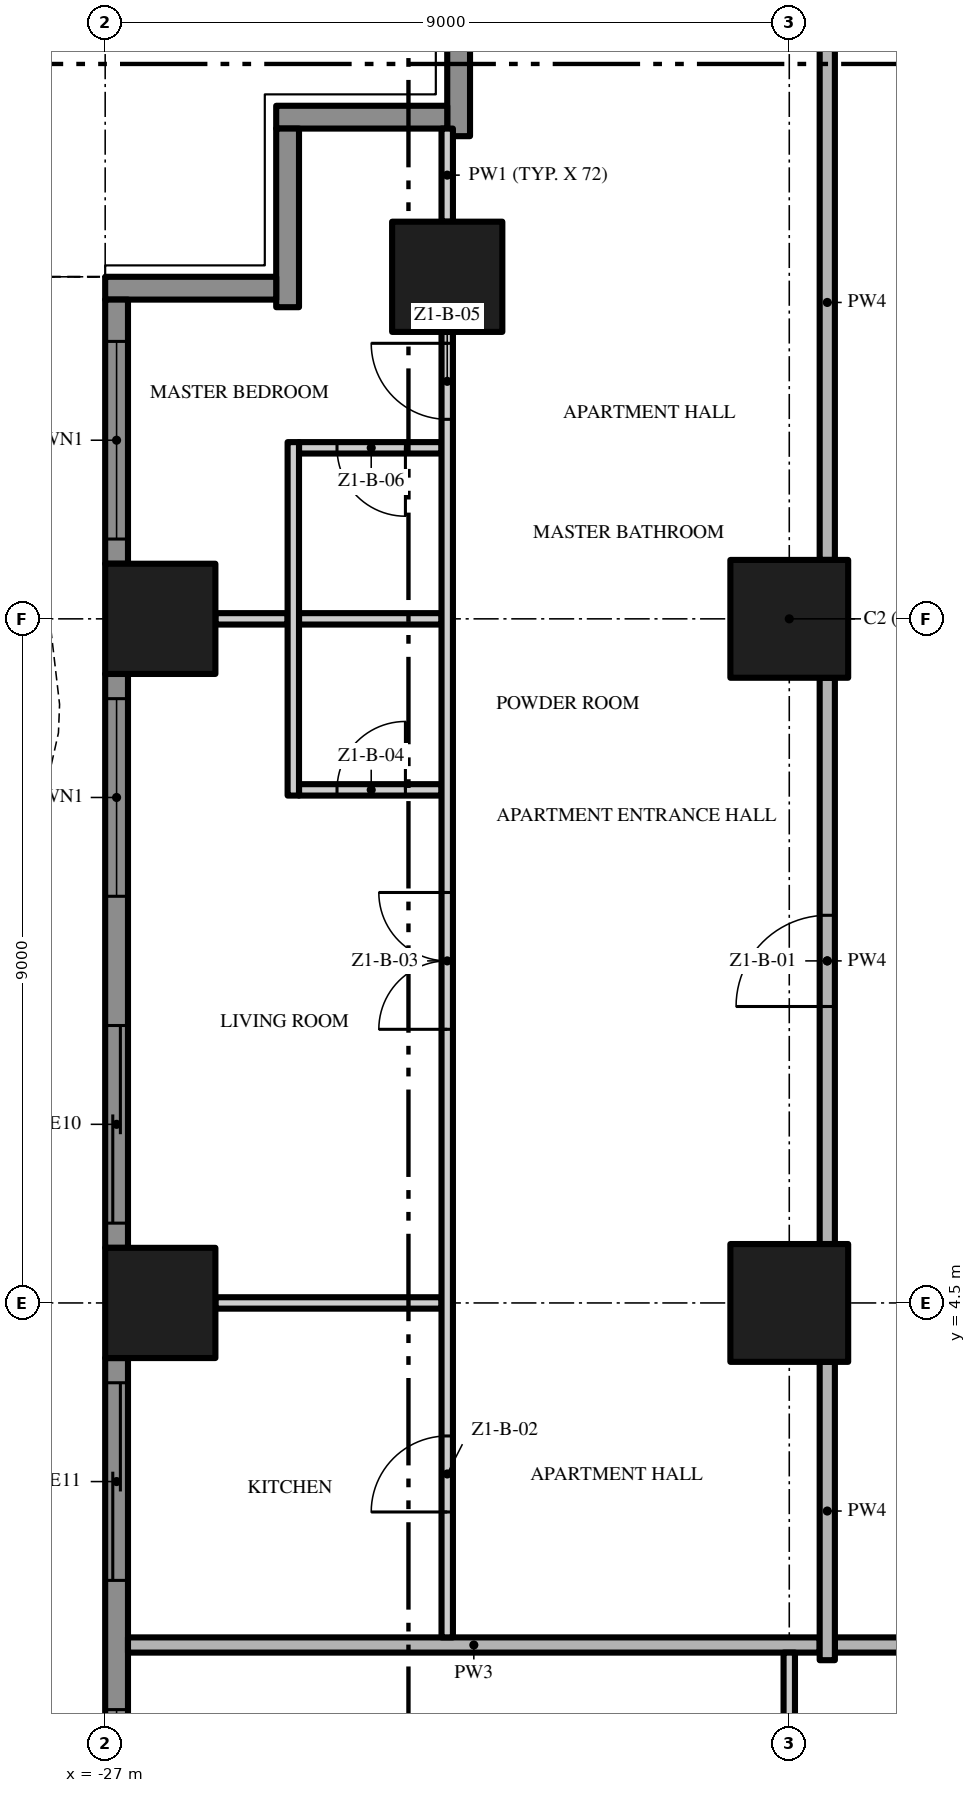
"""IFC4 building model, lengths in metres.
Left out: names, types, materials, properties, quantities, classifications, styles, units other than length and angle.
Written with IfcOpenShell. Run it as: python <this file> out.ifc"""

import sys

from ifc_helpers import new_model, si_unit, direction, frame, frame_2d, origin, origin_2d, place, context, subcontext, project, spatial, polyline, rectangle, outline, extrude, element, fill, save


model = new_model("IFC4")
c1 = context("Model", 3, precision=1e-05, world=origin(), true_north=direction((0.0, 1.0)))
c2 = subcontext(c1, "Body", "Model", "MODEL_VIEW")
j1 = project(units=[si_unit("LENGTHUNIT", "METRE"), si_unit("PLANEANGLEUNIT", "RADIAN")], contexts=[c1])
p1 = place(None, origin())
s1 = spatial("IfcSite", under=j1, at=p1, CompositionType="ELEMENT")
p2 = place(p1, origin())
s2 = spatial("IfcBuilding", under=s1, at=p2, CompositionType="ELEMENT")
p3 = place(p2, frame((0.0, 0.0, 26.4)))
s3 = spatial("IfcBuildingStorey", under=s2, at=p3, CompositionType="ELEMENT", Elevation=26.4)
for number, where, z_axis, x_axis in (
    (1, (-18.0, 13.5, 0.0), (0.0, 0.0, 1.0), (1.0, 0.0, 0.0)),
    (2, (-18.0, 4.5, 0.0), (0.0, 0.0, 1.0), (1.0, 0.0, 0.0)),
):
    element("IfcColumn", number, at=place(p3, frame(where, z_axis=z_axis, x_axis=x_axis)), inside=s3, PredefinedType="COLUMN", context=c2, shape_type="SweptSolid", body=[
        extrude(rectangle(XDim=1.55, YDim=1.55, at=origin_2d()), origin(), (0.0, 0.0, 1.0), 3.5),
    ])
for number, where, z_axis, x_axis in (
    (3, (-26.275, 13.5, 0.0), (0.0, 0.0, 1.0), (1.0, 0.0, 0.0)),
    (4, (-22.5, 18.0, 0.0), (0.0, 0.0, 1.0), (1.0, 0.0, 0.0)),
    (5, (-26.275, 4.5, 0.0), (0.0, 0.0, 1.0), (1.0, 0.0, 0.0)),
):
    element("IfcColumn", number, at=place(p3, frame(where, z_axis=z_axis, x_axis=x_axis)), inside=s3, PredefinedType="COLUMN", context=c2, shape_type="SweptSolid", body=[
        extrude(rectangle(XDim=1.45, YDim=1.45, at=origin_2d()), origin(), (0.0, 0.0, 1.0), 3.5),
    ])
p4 = place(p3, frame((-22.35, 19.85, 0.0), z_axis=(0.0, 0.0, 1.0), x_axis=(0.0, 1.0, 0.0)))
e6 = element("IfcWall", 6, at=p4, inside=s3, PredefinedType="SOLIDWALL", context=c2, shape_type="SweptSolid", body=[
    extrude(rectangle(XDim=2.35, YDim=0.3, at=frame_2d((1.175, 0.0))), origin(), (0.0, 0.0, 1.0), 3.5),
])
p5 = place(p3, frame((-24.75, 20.1, 0.0), z_axis=(0.0, 0.0, 1.0), x_axis=(1.0, 0.0, 0.0)))
e7 = element("IfcWall", 7, at=p5, inside=s3, PredefinedType="SOLIDWALL", context=c2, shape_type="SweptSolid", body=[
    extrude(rectangle(XDim=2.25, YDim=0.3, at=frame_2d((1.125, 0.0))), origin(), (0.0, 0.0, 1.0), 3.5),
])
p6 = place(p3, frame((-24.6, 17.6, 0.0), z_axis=(0.0, 0.0, 1.0), x_axis=(0.0, 1.0, 0.0)))
e8 = element("IfcWall", 8, at=p6, inside=s3, PredefinedType="SOLIDWALL", context=c2, shape_type="SweptSolid", body=[
    extrude(rectangle(XDim=2.35, YDim=0.3, at=frame_2d((1.175, 0.0))), origin(), (0.0, 0.0, 1.0), 3.5),
])
p7 = place(p3, frame((-27.0, 17.85, 0.0), z_axis=(0.0, 0.0, 1.0), x_axis=(1.0, 0.0, 0.0)))
e9 = element("IfcWall", 9, at=p7, inside=s3, PredefinedType="SOLIDWALL", context=c2, shape_type="SweptSolid", body=[
    extrude(rectangle(XDim=2.25, YDim=0.3, at=frame_2d((1.125, 0.0))), origin(), (0.0, 0.0, 1.0), 3.5),
])
p8 = place(p3, frame((-26.85, 14.225, 0.0), z_axis=(0.0, 0.0, 1.0), x_axis=(0.0, 1.0, 0.0)))
e10 = element("IfcWall", 10, at=p8, inside=s3, PredefinedType="SOLIDWALL", context=c2, shape_type="SweptSolid", body=[
    extrude(rectangle(XDim=3.475, YDim=0.3, at=frame_2d((1.738, 0.0))), origin(), (0.0, 0.0, 1.0), 3.5),
])
p9 = place(p8, frame((0.325, 0.0, 0.45)))
e11 = element("IfcOpeningElement", 11, at=p9, cuts=e10, PredefinedType="OPENING", context=c2, shape_type="SweptSolid", body=[
    extrude(rectangle(XDim=2.6, YDim=2.65, at=frame_2d((1.3, 1.325))), frame((0.0, 0.16, 0.0), z_axis=(0.0, -1.0, 0.0), x_axis=(1.0, 0.0, 0.0)), (0.0, 0.0, 1.0), 0.32),
])
p10 = place(p3, frame((-26.85, 5.225, 0.0), z_axis=(0.0, 0.0, 1.0), x_axis=(0.0, 1.0, 0.0)))
e12 = element("IfcWall", 12, at=p10, inside=s3, PredefinedType="SOLIDWALL", context=c2, shape_type="SweptSolid", body=[
    extrude(rectangle(XDim=7.55, YDim=0.3, at=frame_2d((3.775, 0.0))), origin(), (0.0, 0.0, 1.0), 3.5),
])
p11 = place(p10, frame((4.625, 0.0, 0.45)))
e13 = element("IfcOpeningElement", 13, at=p11, cuts=e12, PredefinedType="OPENING", context=c2, shape_type="SweptSolid", body=[
    extrude(rectangle(XDim=2.6, YDim=2.65, at=frame_2d((1.3, 1.325))), frame((0.0, 0.16, 0.0), z_axis=(0.0, -1.0, 0.0), x_axis=(1.0, 0.0, 0.0)), (0.0, 0.0, 1.0), 0.32),
])
p12 = place(p10, frame((0.325, 0.0, 0.0)))
e14 = element("IfcOpeningElement", 14, at=p12, cuts=e12, PredefinedType="OPENING", context=c2, shape_type="SweptSolid", body=[
    extrude(rectangle(XDim=2.6, YDim=2.4, at=frame_2d((1.3, 1.2))), frame((0.0, 0.16, 0.0), z_axis=(0.0, -1.0, 0.0), x_axis=(1.0, 0.0, 0.0)), (0.0, 0.0, 1.0), 0.32),
])
p13 = place(p3, frame((-26.85, -3.775, 0.0), z_axis=(0.0, 0.0, 1.0), x_axis=(0.0, 1.0, 0.0)))
e15 = element("IfcWall", 15, at=p13, inside=s3, PredefinedType="SOLIDWALL", context=c2, shape_type="SweptSolid", body=[
    extrude(rectangle(XDim=7.55, YDim=0.3, at=frame_2d((3.775, 0.0))), origin(), (0.0, 0.0, 1.0), 3.5),
])
p14 = place(p13, frame((4.625, 0.0, 0.0)))
e16 = element("IfcOpeningElement", 16, at=p14, cuts=e15, PredefinedType="OPENING", context=c2, shape_type="SweptSolid", body=[
    extrude(rectangle(XDim=2.6, YDim=2.4, at=frame_2d((1.3, 1.2))), frame((0.0, 0.16, 0.0), z_axis=(0.0, -1.0, 0.0), x_axis=(1.0, 0.0, 0.0)), (0.0, 0.0, 1.0), 0.32),
])
p15 = place(p13, frame((0.325, 0.0, 0.45)))
e17 = element("IfcOpeningElement", 17, at=p15, cuts=e15, PredefinedType="OPENING", context=c2, shape_type="SweptSolid", body=[
    extrude(rectangle(XDim=2.6, YDim=2.65, at=frame_2d((1.3, 1.325))), frame((0.0, 0.16, 0.0), z_axis=(0.0, -1.0, 0.0), x_axis=(1.0, 0.0, 0.0)), (0.0, 0.0, 1.0), 0.32),
])
p16 = place(p3, origin())
e18 = element("IfcWall", 18, at=p16, inside=s3, PredefinedType="USERDEFINED", context=c2, shape_type="SweptSolid", body=[
    extrude(outline(polyline([(-29.649, 18.0), (-28.988, 16.5), (-28.255, 15.0), (-27.731, 13.5), (-27.6, 12.375), (-27.615, 12.0), (-27.951, 10.5), (-28.612, 9.0), (-29.345, 7.5), (-29.869, 6.0), (-30.0, 4.875), (-29.985, 4.5), (-29.649, 3.0), (-28.988, 1.5), (-28.255, 0.0), (-27.731, -1.5), (-27.6, -2.625), (-27.615, -3.0), (-27.951, -4.5), (-28.612, -6.0), (-29.345, -7.5), (-29.869, -9.0), (-30.0, -10.125), (-29.985, -10.5), (-29.649, -12.0), (-28.988, -13.5), (-28.255, -15.0), (-27.731, -16.5), (-27.6, -17.625), (-27.615, -18.0), (-27.365, -18.01), (-27.349, -17.615), (-27.486, -16.444), (-28.024, -14.904), (-28.761, -13.395), (-29.41, -11.921), (-29.736, -10.467), (-29.749, -10.135), (-29.624, -9.056), (-29.114, -7.596), (-28.385, -6.105), (-27.713, -4.579), (-27.366, -3.033), (-27.349, -2.615), (-27.486, -1.444), (-28.024, 0.096), (-28.761, 1.605), (-29.41, 3.079), (-29.736, 4.533), (-29.749, 4.865), (-29.624, 5.944), (-29.114, 7.404), (-28.385, 8.895), (-27.713, 10.421), (-27.366, 11.967), (-27.349, 12.385), (-27.486, 13.556), (-28.024, 15.096), (-28.761, 16.605), (-29.42, 18.101), (-29.649, 18.0)])), origin(), (0.0, 0.0, 1.0), 0.9),
])
p17 = place(p3, frame((-17.4, 0.0, 0.0), z_axis=(0.0, 0.0, 1.0), x_axis=(1.0, 0.0, 0.0)))
e19 = element("IfcWall", 19, at=p17, inside=s3, PredefinedType="PARTITIONING", context=c2, shape_type="SweptSolid", body=[
    extrude(rectangle(XDim=12.8, YDim=0.2, at=frame_2d((6.4, 0.0))), origin(), (0.0, 0.0, 1.0), 3.5),
])
p18 = place(p3, frame((-26.7, 0.0, 0.0), z_axis=(0.0, 0.0, 1.0), x_axis=(1.0, 0.0, 0.0)))
e20 = element("IfcWall", 20, at=p18, inside=s3, PredefinedType="PARTITIONING", context=c2, shape_type="SweptSolid", body=[
    extrude(rectangle(XDim=9.1, YDim=0.2, at=frame_2d((4.55, 0.0))), origin(), (0.0, 0.0, 1.0), 3.5),
])
p19 = place(p3, frame((-25.55, 4.5, 0.0), z_axis=(0.0, 0.0, 1.0), x_axis=(1.0, 0.0, 0.0)))
e21 = element("IfcWall", 21, at=p19, inside=s3, PredefinedType="PARTITIONING", context=c2, shape_type="SweptSolid", body=[
    extrude(rectangle(XDim=2.975, YDim=0.15, at=frame_2d((1.488, 0.0))), origin(), (0.0, 0.0, 1.0), 3.5),
])
p20 = place(p3, frame((-24.45, 11.25, 0.0), z_axis=(0.0, 0.0, 1.0), x_axis=(1.0, 0.0, 0.0)))
e22 = element("IfcWall", 22, at=p20, inside=s3, PredefinedType="PARTITIONING", context=c2, shape_type="SweptSolid", body=[
    extrude(rectangle(XDim=1.875, YDim=0.15, at=frame_2d((0.938, 0.0))), origin(), (0.0, 0.0, 1.0), 3.5),
])
p21 = place(p20, frame((0.5, 0.0, 0.0)))
e23 = element("IfcOpeningElement", 23, at=p21, cuts=e22, PredefinedType="OPENING", context=c2, shape_type="SweptSolid", body=[
    extrude(rectangle(XDim=0.9, YDim=2.1, at=frame_2d((0.45, 1.05))), frame((0.0, 0.085, 0.0), z_axis=(0.0, -1.0, 0.0), x_axis=(1.0, 0.0, 0.0)), (0.0, 0.0, 1.0), 0.17),
])
p22 = place(p3, frame((-25.55, 13.5, 0.0), z_axis=(0.0, 0.0, 1.0), x_axis=(1.0, 0.0, 0.0)))
e24 = element("IfcWall", 24, at=p22, inside=s3, PredefinedType="PARTITIONING", context=c2, shape_type="SweptSolid", body=[
    extrude(rectangle(XDim=0.95, YDim=0.15, at=frame_2d((0.475, 0.0))), origin(), (0.0, 0.0, 1.0), 3.5),
])
p23 = place(p3, frame((-24.45, 13.5, 0.0), z_axis=(0.0, 0.0, 1.0), x_axis=(1.0, 0.0, 0.0)))
e25 = element("IfcWall", 25, at=p23, inside=s3, PredefinedType="PARTITIONING", context=c2, shape_type="SweptSolid", body=[
    extrude(rectangle(XDim=1.875, YDim=0.15, at=frame_2d((0.938, 0.0))), origin(), (0.0, 0.0, 1.0), 3.5),
])
p24 = place(p3, frame((-22.575, 15.75, 0.0), z_axis=(0.0, 0.0, 1.0), x_axis=(-1.0, 0.0, 0.0)))
e26 = element("IfcWall", 26, at=p24, inside=s3, PredefinedType="PARTITIONING", context=c2, shape_type="SweptSolid", body=[
    extrude(rectangle(XDim=1.875, YDim=0.15, at=frame_2d((0.938, 0.0))), origin(), (0.0, 0.0, 1.0), 3.5),
])
p25 = place(p24, frame((0.475, 0.0, 0.0)))
e27 = element("IfcOpeningElement", 27, at=p25, cuts=e26, PredefinedType="OPENING", context=c2, shape_type="SweptSolid", body=[
    extrude(rectangle(XDim=0.9, YDim=2.1, at=frame_2d((0.45, 1.05))), frame((0.0, 0.085, 0.0), z_axis=(0.0, -1.0, 0.0), x_axis=(1.0, 0.0, 0.0)), (0.0, 0.0, 1.0), 0.17),
])
p26 = place(p3, frame((-24.525, 11.175, 0.0), z_axis=(0.0, 0.0, 1.0), x_axis=(0.0, 1.0, 0.0)))
e28 = element("IfcWall", 28, at=p26, inside=s3, PredefinedType="PARTITIONING", context=c2, shape_type="SweptSolid", body=[
    extrude(rectangle(XDim=4.65, YDim=0.15, at=frame_2d((2.325, 0.0))), origin(), (0.0, 0.0, 1.0), 3.5),
])
p27 = place(p3, frame((-22.5, 0.1, 0.0), z_axis=(0.0, 0.0, 1.0), x_axis=(0.0, 1.0, 0.0)))
e29 = element("IfcWall", 29, at=p27, inside=s3, PredefinedType="PARTITIONING", context=c2, shape_type="SweptSolid", body=[
    extrude(rectangle(XDim=17.175, YDim=0.15, at=frame_2d((8.588, 0.0))), origin(), (0.0, 0.0, 1.0), 3.5),
])
p28 = place(p27, frame((1.65, 0.0, 0.0)))
e30 = element("IfcOpeningElement", 30, at=p28, cuts=e29, PredefinedType="OPENING", context=c2, shape_type="SweptSolid", body=[
    extrude(rectangle(XDim=1.0, YDim=2.4, at=frame_2d((0.5, 1.2))), frame((0.0, 0.085, 0.0), z_axis=(0.0, -1.0, 0.0), x_axis=(1.0, 0.0, 0.0)), (0.0, 0.0, 1.0), 0.17),
])
p29 = place(p27, frame((8.0, 0.0, 0.0)))
e31 = element("IfcOpeningElement", 31, at=p29, cuts=e29, PredefinedType="OPENING", context=c2, shape_type="SweptSolid", body=[
    extrude(rectangle(XDim=1.8, YDim=2.4, at=frame_2d((0.9, 1.2))), frame((0.0, 0.085, 0.0), z_axis=(0.0, -1.0, 0.0), x_axis=(1.0, 0.0, 0.0)), (0.0, 0.0, 1.0), 0.17),
])
p30 = place(p27, frame((16.025, 0.0, 0.0)))
e32 = element("IfcOpeningElement", 32, at=p30, cuts=e29, PredefinedType="OPENING", context=c2, shape_type="SweptSolid", body=[
    extrude(rectangle(XDim=1.0, YDim=2.4, at=frame_2d((0.5, 1.2))), frame((0.0, 0.085, 0.0), z_axis=(0.0, -1.0, 0.0), x_axis=(1.0, 0.0, 0.0)), (0.0, 0.0, 1.0), 0.17),
])
p31 = place(p3, frame((-22.5, 18.725, 0.0), z_axis=(0.0, 0.0, 1.0), x_axis=(0.0, 1.0, 0.0)))
e33 = element("IfcWall", 33, at=p31, inside=s3, PredefinedType="PARTITIONING", context=c2, shape_type="SweptSolid", body=[
    extrude(rectangle(XDim=1.225, YDim=0.15, at=frame_2d((0.613, 0.0))), origin(), (0.0, 0.0, 1.0), 3.5),
])
p32 = place(p3, frame((-18.0, -3.725, 0.0), z_axis=(0.0, 0.0, 1.0), x_axis=(0.0, 1.0, 0.0)))
e34 = element("IfcWall", 34, at=p32, inside=s3, PredefinedType="PARTITIONING", context=c2, shape_type="SweptSolid", body=[
    extrude(rectangle(XDim=3.625, YDim=0.15, at=frame_2d((1.812, 0.0))), origin(), (0.0, 0.0, 1.0), 3.5),
])
p33 = place(p32, frame((0.75, 0.0, 0.0)))
e35 = element("IfcOpeningElement", 35, at=p33, cuts=e34, PredefinedType="OPENING", context=c2, shape_type="SweptSolid", body=[
    extrude(rectangle(XDim=1.5, YDim=2.4, at=frame_2d((0.75, 1.2))), frame((0.0, 0.085, 0.0), z_axis=(0.0, -1.0, 0.0), x_axis=(1.0, 0.0, 0.0)), (0.0, 0.0, 1.0), 0.17),
])
p34 = place(p3, frame((-17.5, -0.2, 0.0), z_axis=(0.0, 0.0, 1.0), x_axis=(0.0, 1.0, 0.0)))
e36 = element("IfcWall", 36, at=p34, inside=s3, PredefinedType="PARTITIONING", context=c2, shape_type="SweptSolid", body=[
    extrude(rectangle(XDim=3.925, YDim=0.2, at=frame_2d((1.962, 0.0))), origin(), (0.0, 0.0, 1.0), 3.5),
])
p35 = place(p3, frame((-17.5, 5.275, 0.0), z_axis=(0.0, 0.0, 1.0), x_axis=(0.0, 1.0, 0.0)))
e37 = element("IfcWall", 37, at=p35, inside=s3, PredefinedType="PARTITIONING", context=c2, shape_type="SweptSolid", body=[
    extrude(rectangle(XDim=7.45, YDim=0.2, at=frame_2d((3.725, 0.0))), origin(), (0.0, 0.0, 1.0), 3.5),
])
p36 = place(p35, frame((3.125, 0.0, 0.0)))
e38 = element("IfcOpeningElement", 38, at=p36, cuts=e37, PredefinedType="OPENING", context=c2, shape_type="SweptSolid", body=[
    extrude(rectangle(XDim=1.2, YDim=2.4, at=frame_2d((0.6, 1.2))), frame((0.0, 0.11, 0.0), z_axis=(0.0, -1.0, 0.0), x_axis=(1.0, 0.0, 0.0)), (0.0, 0.0, 1.0), 0.22),
])
p37 = place(p3, frame((-17.5, 14.275, 0.0), z_axis=(0.0, 0.0, 1.0), x_axis=(0.0, 1.0, 0.0)))
e39 = element("IfcWall", 39, at=p37, inside=s3, PredefinedType="PARTITIONING", context=c2, shape_type="SweptSolid", body=[
    extrude(rectangle(XDim=6.775, YDim=0.2, at=frame_2d((3.388, 0.0))), origin(), (0.0, 0.0, 1.0), 3.5),
])
p38 = place(p9, origin())
e40 = element("IfcWindow", 40, at=p38, inside=s3, PartitioningType="SINGLE_PANEL", PredefinedType="WINDOW", context=c2, shape_type="SweptSolid", body=[
    extrude(rectangle(XDim=2.6, YDim=2.65, at=frame_2d((1.3, 1.325))), frame((0.0, 0.03, 0.0), z_axis=(0.0, -1.0, 0.0), x_axis=(1.0, 0.0, 0.0)), (0.0, 0.0, 1.0), 0.06),
])
fill(e11, e40)
p39 = place(p11, origin())
e41 = element("IfcWindow", 41, at=p39, inside=s3, PartitioningType="SINGLE_PANEL", PredefinedType="WINDOW", context=c2, shape_type="SweptSolid", body=[
    extrude(rectangle(XDim=2.6, YDim=2.65, at=frame_2d((1.3, 1.325))), frame((0.0, 0.03, 0.0), z_axis=(0.0, -1.0, 0.0), x_axis=(1.0, 0.0, 0.0)), (0.0, 0.0, 1.0), 0.06),
])
fill(e13, e41)
p40 = place(p12, origin())
e42 = element("IfcDoor", 42, at=p40, inside=s3, OperationType="SINGLE_SWING_LEFT", PredefinedType="DOOR", context=c2, shape_type="SweptSolid", body=[
    extrude(rectangle(XDim=2.6, YDim=2.4, at=frame_2d((1.3, 1.2))), frame((0.0, 0.025, 0.0), z_axis=(0.0, -1.0, 0.0), x_axis=(1.0, 0.0, 0.0)), (0.0, 0.0, 1.0), 0.05),
])
fill(e14, e42)
p41 = place(p14, origin())
e43 = element("IfcDoor", 43, at=p41, inside=s3, OperationType="SINGLE_SWING_LEFT", PredefinedType="DOOR", context=c2, shape_type="SweptSolid", body=[
    extrude(rectangle(XDim=2.6, YDim=2.4, at=frame_2d((1.3, 1.2))), frame((0.0, 0.025, 0.0), z_axis=(0.0, -1.0, 0.0), x_axis=(1.0, 0.0, 0.0)), (0.0, 0.0, 1.0), 0.05),
])
fill(e16, e43)
p42 = place(p15, origin())
e44 = element("IfcWindow", 44, at=p42, inside=s3, PartitioningType="SINGLE_PANEL", PredefinedType="WINDOW", context=c2, shape_type="SweptSolid", body=[
    extrude(rectangle(XDim=2.6, YDim=2.65, at=frame_2d((1.3, 1.325))), frame((0.0, 0.03, 0.0), z_axis=(0.0, -1.0, 0.0), x_axis=(1.0, 0.0, 0.0)), (0.0, 0.0, 1.0), 0.06),
])
fill(e17, e44)
p43 = place(p36, origin())
e45 = element("IfcDoor", 45, at=p43, inside=s3, OperationType="SINGLE_SWING_LEFT", PredefinedType="DOOR", context=c2, shape_type="SweptSolid", body=[
    extrude(rectangle(XDim=1.2, YDim=2.4, at=frame_2d((0.6, 1.2))), frame((0.0, 0.025, 0.0), z_axis=(0.0, -1.0, 0.0), x_axis=(1.0, 0.0, 0.0)), (0.0, 0.0, 1.0), 0.05),
])
fill(e38, e45)
p44 = place(p28, origin())
e46 = element("IfcDoor", 46, at=p44, inside=s3, OperationType="SINGLE_SWING_LEFT", PredefinedType="DOOR", context=c2, shape_type="SweptSolid", body=[
    extrude(rectangle(XDim=1.0, YDim=2.4, at=frame_2d((0.5, 1.2))), frame((0.0, 0.025, 0.0), z_axis=(0.0, -1.0, 0.0), x_axis=(1.0, 0.0, 0.0)), (0.0, 0.0, 1.0), 0.05),
])
fill(e30, e46)
p45 = place(p29, origin())
e47 = element("IfcDoor", 47, at=p45, inside=s3, OperationType="DOUBLE_DOOR_SINGLE_SWING", PredefinedType="DOOR", context=c2, shape_type="SweptSolid", body=[
    extrude(rectangle(XDim=1.8, YDim=2.4, at=frame_2d((0.9, 1.2))), frame((0.0, 0.025, 0.0), z_axis=(0.0, -1.0, 0.0), x_axis=(1.0, 0.0, 0.0)), (0.0, 0.0, 1.0), 0.05),
])
fill(e31, e47)
p46 = place(p21, origin())
e48 = element("IfcDoor", 48, at=p46, inside=s3, OperationType="SINGLE_SWING_RIGHT", PredefinedType="DOOR", context=c2, shape_type="SweptSolid", body=[
    extrude(rectangle(XDim=0.9, YDim=2.1, at=frame_2d((0.45, 1.05))), frame((0.0, 0.025, 0.0), z_axis=(0.0, -1.0, 0.0), x_axis=(1.0, 0.0, 0.0)), (0.0, 0.0, 1.0), 0.05),
])
fill(e23, e48)
p47 = place(p30, origin())
e49 = element("IfcDoor", 49, at=p47, inside=s3, OperationType="SINGLE_SWING_RIGHT", PredefinedType="DOOR", context=c2, shape_type="SweptSolid", body=[
    extrude(rectangle(XDim=1.0, YDim=2.4, at=frame_2d((0.5, 1.2))), frame((0.0, 0.025, 0.0), z_axis=(0.0, -1.0, 0.0), x_axis=(1.0, 0.0, 0.0)), (0.0, 0.0, 1.0), 0.05),
])
fill(e32, e49)
p48 = place(p25, origin())
e50 = element("IfcDoor", 50, at=p48, inside=s3, OperationType="SINGLE_SWING_LEFT", PredefinedType="DOOR", context=c2, shape_type="SweptSolid", body=[
    extrude(rectangle(XDim=0.9, YDim=2.1, at=frame_2d((0.45, 1.05))), frame((0.0, 0.025, 0.0), z_axis=(0.0, -1.0, 0.0), x_axis=(1.0, 0.0, 0.0)), (0.0, 0.0, 1.0), 0.05),
])
fill(e27, e50)
save(model, sys.argv[1])
